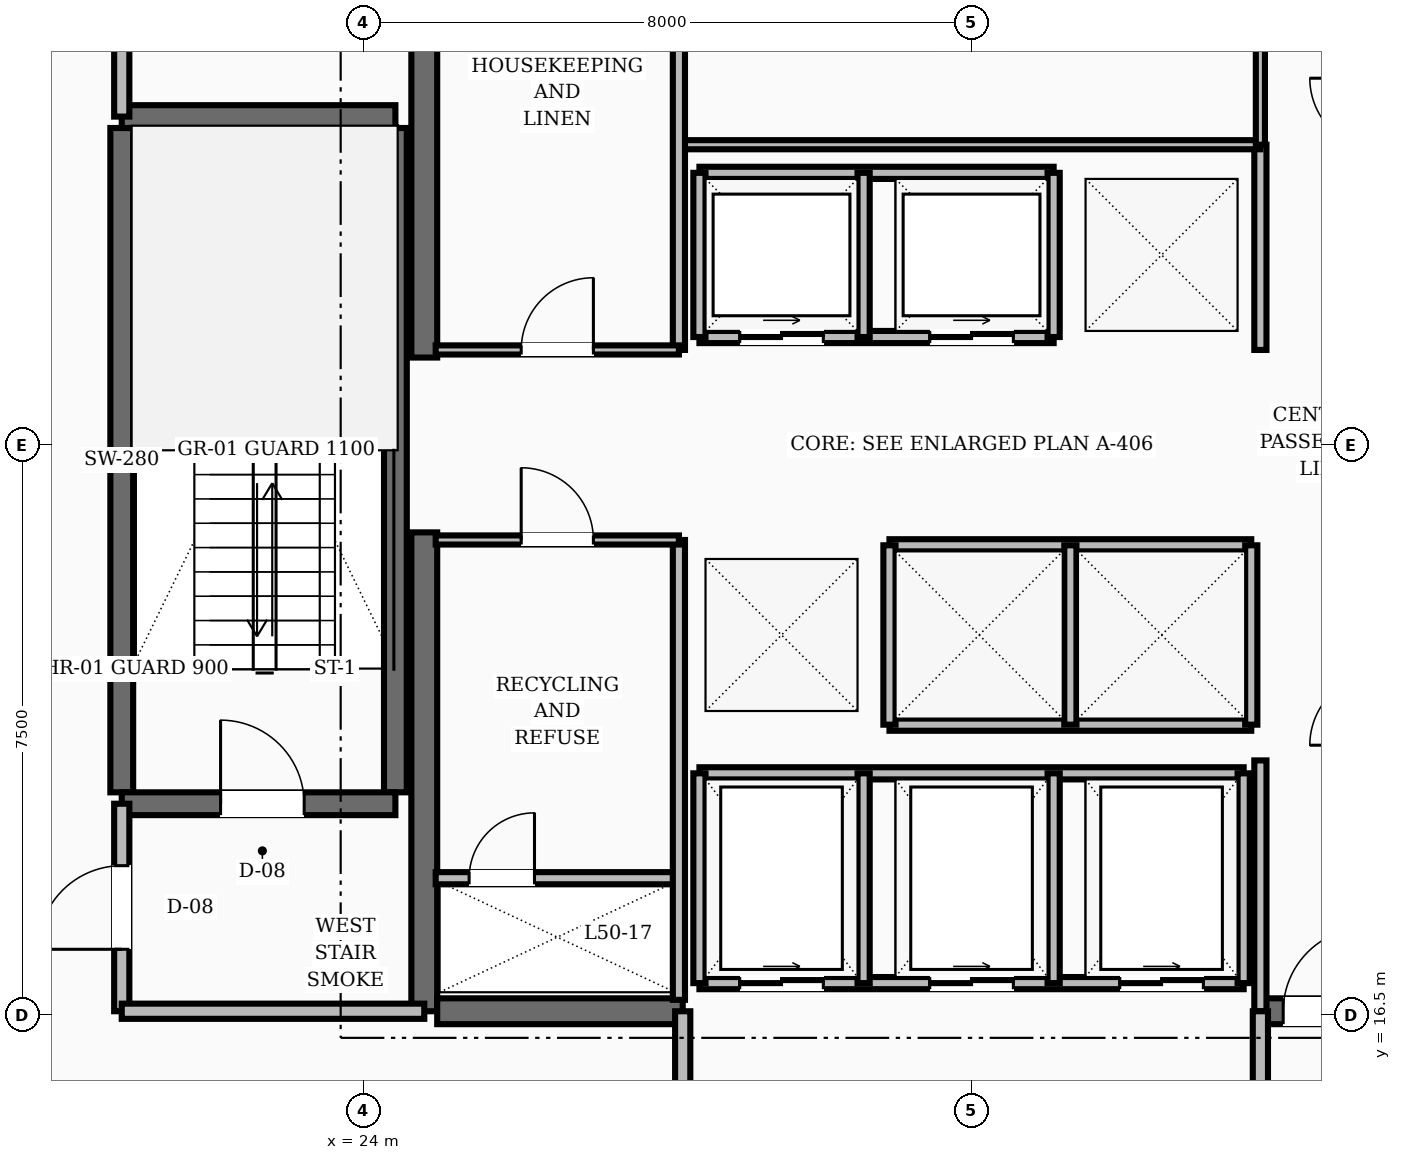
"""IFC4 building model, lengths in metres.
Left out: names, types, materials, properties, quantities, classifications, styles, units other than length and angle.
Written with IfcOpenShell. Run it as: python <this file> out.ifc"""

import sys

from ifc_helpers import new_model, si_unit, direction, frame, frame_2d, origin, place, context, subcontext, project, spatial, rectangle, extrude, element, fill, save


model = new_model("IFC4")
c1 = context("Model", 3, precision=1e-05, world=origin(), true_north=direction((0.0, 1.0)))
c2 = subcontext(c1, "Body", "Model", "MODEL_VIEW")
j1 = project(units=[si_unit("LENGTHUNIT", "METRE"), si_unit("PLANEANGLEUNIT", "RADIAN")], contexts=[c1])
p1 = place(None, origin())
s1 = spatial("IfcSite", under=j1, at=p1, CompositionType="ELEMENT")
p2 = place(p1, origin())
s2 = spatial("IfcBuilding", under=s1, at=p2, CompositionType="ELEMENT")
p3 = place(p2, frame((0.0, 0.0, 192.8)))
s3 = spatial("IfcBuildingStorey", under=s2, at=p3, CompositionType="ELEMENT", Elevation=192.8)
for number, where, z_axis, x_axis in (
    (1, (24.8, 16.55, 0.0), (0.0, 0.0, 1.0), (0.0, 1.0, 0.0)),
    (2, (24.8, 25.15, 0.0), (0.0, 0.0, 1.0), (0.0, 1.0, 0.0)),
):
    element("IfcWall", number, at=place(p3, frame(where, z_axis=z_axis, x_axis=x_axis)), inside=s3, PredefinedType="SHEAR", context=c2, shape_type="SweptSolid", body=[
        extrude(rectangle(XDim=6.3, YDim=0.34, at=frame_2d((3.15, 0.0))), origin(), (0.0, 0.0, 1.0), 3.6),
    ])
p4 = place(p3, frame((24.97, 16.55, 0.0), z_axis=(0.0, 0.0, 1.0), x_axis=(1.0, 0.0, 0.0)))
e3 = element("IfcWall", 3, at=p4, inside=s3, PredefinedType="SHEAR", context=c2, shape_type="SweptSolid", body=[
    extrude(rectangle(XDim=3.23, YDim=0.34, at=frame_2d((1.615, 0.0))), origin(), (0.0, 0.0, 1.0), 3.6),
])
p5 = place(p3, frame((35.8, 16.55, 0.0), z_axis=(0.0, 0.0, 1.0), x_axis=(1.0, 0.0, 0.0)))
e4 = element("IfcWall", 4, at=p5, inside=s3, PredefinedType="SHEAR", context=c2, shape_type="SweptSolid", body=[
    extrude(rectangle(XDim=3.23, YDim=0.34, at=frame_2d((1.615, 0.0))), origin(), (0.0, 0.0, 1.0), 3.6),
])
p6 = place(p5, frame((0.3, 0.0, 0.0)))
e5 = element("IfcOpeningElement", 5, at=p6, cuts=e4, PredefinedType="OPENING", context=c2, shape_type="SweptSolid", body=[
    extrude(rectangle(XDim=1.1, YDim=2.1, at=frame_2d((0.55, 1.05))), frame((0.0, 0.18, 0.0), z_axis=(0.0, -1.0, 0.0), x_axis=(1.0, 0.0, 0.0)), (0.0, 0.0, 1.0), 0.36),
])
for number, where, z_axis, x_axis in (
    (6, (20.82, 19.43, 0.0), (0.0, 0.0, 1.0), (0.0, 1.0, 0.0)),
    (7, (24.42, 19.43, 0.0), (0.0, 0.0, 1.0), (0.0, 1.0, 0.0)),
):
    element("IfcWall", number, at=place(p3, frame(where, z_axis=z_axis, x_axis=x_axis)), inside=s3, PredefinedType="SHEAR", context=c2, shape_type="SweptSolid", body=[
        extrude(rectangle(XDim=8.74, YDim=0.3, at=frame_2d((4.37, 0.0))), origin(), (0.0, 0.0, 1.0), 3.6),
    ])
p7 = place(p3, frame((20.82, 19.28, 0.0), z_axis=(0.0, 0.0, 1.0), x_axis=(1.0, 0.0, 0.0)))
e8 = element("IfcWall", 8, at=p7, inside=s3, PredefinedType="SHEAR", context=c2, shape_type="SweptSolid", body=[
    extrude(rectangle(XDim=3.6, YDim=0.3, at=frame_2d((1.8, 0.0))), origin(), (0.0, 0.0, 1.0), 3.6),
])
p8 = place(p7, frame((1.3, 0.0, 0.0)))
e9 = element("IfcOpeningElement", 9, at=p8, cuts=e8, PredefinedType="OPENING", context=c2, shape_type="SweptSolid", body=[
    extrude(rectangle(XDim=1.1, YDim=2.1, at=frame_2d((0.55, 1.05))), frame((0.0, 0.16, 0.0), z_axis=(0.0, -1.0, 0.0), x_axis=(1.0, 0.0, 0.0)), (0.0, 0.0, 1.0), 0.32),
])
p9 = place(p3, frame((20.82, 28.32, 0.0), z_axis=(0.0, 0.0, 1.0), x_axis=(1.0, 0.0, 0.0)))
e10 = element("IfcWall", 10, at=p9, inside=s3, PredefinedType="SHEAR", context=c2, shape_type="SweptSolid", body=[
    extrude(rectangle(XDim=3.6, YDim=0.3, at=frame_2d((1.8, 0.0))), origin(), (0.0, 0.0, 1.0), 3.6),
])
p10 = place(p3, frame((20.82, 16.55, 0.0), z_axis=(0.0, 0.0, 1.0), x_axis=(0.0, 1.0, 0.0)))
e11 = element("IfcWall", 11, at=p10, inside=s3, PredefinedType="SOLIDWALL", context=c2, shape_type="SweptSolid", body=[
    extrude(rectangle(XDim=2.73, YDim=0.2, at=frame_2d((1.365, 0.0))), origin(), (0.0, 0.0, 1.0), 2.8),
])
p11 = place(p10, frame((0.815, 0.0, 0.0)))
e12 = element("IfcOpeningElement", 12, at=p11, cuts=e11, PredefinedType="OPENING", context=c2, shape_type="SweptSolid", body=[
    extrude(rectangle(XDim=1.1, YDim=2.1, at=frame_2d((0.55, 1.05))), frame((0.0, 0.11, 0.0), z_axis=(0.0, -1.0, 0.0), x_axis=(1.0, 0.0, 0.0)), (0.0, 0.0, 1.0), 0.22),
])
p12 = place(p3, frame((20.82, 16.55, 0.0), z_axis=(0.0, 0.0, 1.0), x_axis=(1.0, 0.0, 0.0)))
e13 = element("IfcWall", 13, at=p12, inside=s3, PredefinedType="SOLIDWALL", context=c2, shape_type="SweptSolid", body=[
    extrude(rectangle(XDim=3.98, YDim=0.2, at=frame_2d((1.99, 0.0))), origin(), (0.0, 0.0, 1.0), 2.8),
])
p13 = place(p3, frame((20.82, 28.32, 0.0), z_axis=(0.0, 0.0, 1.0), x_axis=(0.0, 1.0, 0.0)))
e14 = element("IfcWall", 14, at=p13, inside=s3, PredefinedType="SOLIDWALL", context=c2, shape_type="SweptSolid", body=[
    extrude(rectangle(XDim=3.13, YDim=0.2, at=frame_2d((1.565, 0.0))), origin(), (0.0, 0.0, 1.0), 2.8),
])
p14 = place(p13, frame((1.09, 0.0, 0.0)))
e15 = element("IfcOpeningElement", 15, at=p14, cuts=e14, PredefinedType="OPENING", context=c2, shape_type="SweptSolid", body=[
    extrude(rectangle(XDim=0.95, YDim=2.1, at=frame_2d((0.475, 1.05))), frame((0.0, 0.11, 0.0), z_axis=(0.0, -1.0, 0.0), x_axis=(1.0, 0.0, 0.0)), (0.0, 0.0, 1.0), 0.22),
])
p15 = place(p3, frame((35.8, 16.55, 0.0), z_axis=(0.0, 0.0, 1.0), x_axis=(0.0, 1.0, 0.0)))
e16 = element("IfcWall", 16, at=p15, inside=s3, PredefinedType="SOLIDWALL", context=c2, shape_type="SweptSolid", body=[
    extrude(rectangle(XDim=3.3, YDim=0.16, at=frame_2d((1.65, 0.0))), origin(), (0.0, 0.0, 1.0), 2.8),
])
p16 = place(p3, frame((35.8, 25.25, 0.0), z_axis=(0.0, 0.0, 1.0), x_axis=(0.0, 1.0, 0.0)))
e17 = element("IfcWall", 17, at=p16, inside=s3, PredefinedType="SOLIDWALL", context=c2, shape_type="SweptSolid", body=[
    extrude(rectangle(XDim=2.7, YDim=0.16, at=frame_2d((1.35, 0.0))), origin(), (0.0, 0.0, 1.0), 2.8),
])
for number, where, z_axis, x_axis in (
    (18, (28.2, 14.35, 0.0), (0.0, 0.0, 1.0), (0.0, 1.0, 0.0)),
    (19, (35.8, 14.35, 0.0), (0.0, 0.0, 1.0), (0.0, 1.0, 0.0)),
):
    element("IfcWall", number, at=place(p3, frame(where, z_axis=z_axis, x_axis=x_axis)), inside=s3, PredefinedType="SOLIDWALL", context=c2, shape_type="SweptSolid", body=[
        extrude(rectangle(XDim=2.2, YDim=0.2, at=frame_2d((1.1, 0.0))), origin(), (0.0, 0.0, 1.0), 2.8),
    ])
p17 = place(p3, frame((28.42, 25.42, 0.0), z_axis=(0.0, 0.0, 1.0), x_axis=(1.0, 0.0, 0.0)))
e20 = element("IfcWall", 20, at=p17, inside=s3, PredefinedType="SOLIDWALL", context=c2, shape_type="SweptSolid", body=[
    extrude(rectangle(XDim=4.66, YDim=0.16, at=frame_2d((2.33, 0.0))), origin(), (0.0, 0.0, 1.0), 2.8),
])
p18 = place(p17, frame((0.53, 0.0, 0.0)))
e21 = element("IfcOpeningElement", 21, at=p18, cuts=e20, PredefinedType="OPENING", context=c2, shape_type="SweptSolid", body=[
    extrude(rectangle(XDim=1.1, YDim=2.15, at=frame_2d((0.55, 1.075))), frame((0.0, 0.09, 0.0), z_axis=(0.0, -1.0, 0.0), x_axis=(1.0, 0.0, 0.0)), (0.0, 0.0, 1.0), 0.18),
])
p19 = place(p17, frame((3.03, 0.0, 0.0)))
e22 = element("IfcOpeningElement", 22, at=p19, cuts=e20, PredefinedType="OPENING", context=c2, shape_type="SweptSolid", body=[
    extrude(rectangle(XDim=1.1, YDim=2.15, at=frame_2d((0.55, 1.075))), frame((0.0, 0.09, 0.0), z_axis=(0.0, -1.0, 0.0), x_axis=(1.0, 0.0, 0.0)), (0.0, 0.0, 1.0), 0.18),
])
p20 = place(p3, frame((28.42, 27.58, 0.0), z_axis=(0.0, 0.0, 1.0), x_axis=(1.0, 0.0, 0.0)))
e23 = element("IfcWall", 23, at=p20, inside=s3, PredefinedType="SOLIDWALL", context=c2, shape_type="SweptSolid", body=[
    extrude(rectangle(XDim=4.66, YDim=0.16, at=frame_2d((2.33, 0.0))), origin(), (0.0, 0.0, 1.0), 2.8),
])
for number, where, z_axis, x_axis in (
    (24, (28.42, 25.42, 0.0), (0.0, 0.0, 1.0), (0.0, 1.0, 0.0)),
    (25, (30.58, 25.42, 0.0), (0.0, 0.0, 1.0), (0.0, 1.0, 0.0)),
    (26, (33.08, 25.42, 0.0), (0.0, 0.0, 1.0), (0.0, 1.0, 0.0)),
):
    element("IfcWall", number, at=place(p3, frame(where, z_axis=z_axis, x_axis=x_axis)), inside=s3, PredefinedType="SOLIDWALL", context=c2, shape_type="SweptSolid", body=[
        extrude(rectangle(XDim=2.16, YDim=0.16, at=frame_2d((1.08, 0.0))), origin(), (0.0, 0.0, 1.0), 2.8),
    ])
for number, where, z_axis, x_axis in (
    (27, (30.92, 22.68, 0.0), (0.0, 0.0, 1.0), (1.0, 0.0, 0.0)),
    (28, (30.92, 20.32, 0.0), (0.0, 0.0, 1.0), (1.0, 0.0, 0.0)),
):
    element("IfcWall", number, at=place(p3, frame(where, z_axis=z_axis, x_axis=x_axis)), inside=s3, PredefinedType="SOLIDWALL", context=c2, shape_type="SweptSolid", body=[
        extrude(rectangle(XDim=4.76, YDim=0.16, at=frame_2d((2.38, 0.0))), origin(), (0.0, 0.0, 1.0), 2.8),
    ])
for number, where, z_axis, x_axis in (
    (29, (30.92, 20.32, 0.0), (0.0, 0.0, 1.0), (0.0, 1.0, 0.0)),
    (30, (33.3, 20.32, 0.0), (0.0, 0.0, 1.0), (0.0, 1.0, 0.0)),
    (31, (35.68, 20.32, 0.0), (0.0, 0.0, 1.0), (0.0, 1.0, 0.0)),
):
    element("IfcWall", number, at=place(p3, frame(where, z_axis=z_axis, x_axis=x_axis)), inside=s3, PredefinedType="SOLIDWALL", context=c2, shape_type="SweptSolid", body=[
        extrude(rectangle(XDim=2.36, YDim=0.16, at=frame_2d((1.18, 0.0))), origin(), (0.0, 0.0, 1.0), 2.8),
    ])
p21 = place(p3, frame((28.42, 16.92, 0.0), z_axis=(0.0, 0.0, 1.0), x_axis=(1.0, 0.0, 0.0)))
e32 = element("IfcWall", 32, at=p21, inside=s3, PredefinedType="SOLIDWALL", context=c2, shape_type="SweptSolid", body=[
    extrude(rectangle(XDim=7.16, YDim=0.16, at=frame_2d((3.58, 0.0))), origin(), (0.0, 0.0, 1.0), 2.8),
])
p22 = place(p21, frame((0.53, 0.0, 0.0)))
e33 = element("IfcOpeningElement", 33, at=p22, cuts=e32, PredefinedType="OPENING", context=c2, shape_type="SweptSolid", body=[
    extrude(rectangle(XDim=1.1, YDim=2.15, at=frame_2d((0.55, 1.075))), frame((0.0, 0.09, 0.0), z_axis=(0.0, -1.0, 0.0), x_axis=(1.0, 0.0, 0.0)), (0.0, 0.0, 1.0), 0.18),
])
p23 = place(p21, frame((3.03, 0.0, 0.0)))
e34 = element("IfcOpeningElement", 34, at=p23, cuts=e32, PredefinedType="OPENING", context=c2, shape_type="SweptSolid", body=[
    extrude(rectangle(XDim=1.1, YDim=2.15, at=frame_2d((0.55, 1.075))), frame((0.0, 0.09, 0.0), z_axis=(0.0, -1.0, 0.0), x_axis=(1.0, 0.0, 0.0)), (0.0, 0.0, 1.0), 0.18),
])
p24 = place(p21, frame((5.53, 0.0, 0.0)))
e35 = element("IfcOpeningElement", 35, at=p24, cuts=e32, PredefinedType="OPENING", context=c2, shape_type="SweptSolid", body=[
    extrude(rectangle(XDim=1.1, YDim=2.15, at=frame_2d((0.55, 1.075))), frame((0.0, 0.09, 0.0), z_axis=(0.0, -1.0, 0.0), x_axis=(1.0, 0.0, 0.0)), (0.0, 0.0, 1.0), 0.18),
])
p25 = place(p3, frame((28.42, 19.68, 0.0), z_axis=(0.0, 0.0, 1.0), x_axis=(1.0, 0.0, 0.0)))
e36 = element("IfcWall", 36, at=p25, inside=s3, PredefinedType="SOLIDWALL", context=c2, shape_type="SweptSolid", body=[
    extrude(rectangle(XDim=7.16, YDim=0.16, at=frame_2d((3.58, 0.0))), origin(), (0.0, 0.0, 1.0), 2.8),
])
for number, where, z_axis, x_axis in (
    (37, (28.42, 16.92, 0.0), (0.0, 0.0, 1.0), (0.0, 1.0, 0.0)),
    (38, (30.58, 16.92, 0.0), (0.0, 0.0, 1.0), (0.0, 1.0, 0.0)),
    (39, (33.08, 16.92, 0.0), (0.0, 0.0, 1.0), (0.0, 1.0, 0.0)),
    (40, (35.58, 16.92, 0.0), (0.0, 0.0, 1.0), (0.0, 1.0, 0.0)),
):
    element("IfcWall", number, at=place(p3, frame(where, z_axis=z_axis, x_axis=x_axis)), inside=s3, PredefinedType="SOLIDWALL", context=c2, shape_type="SweptSolid", body=[
        extrude(rectangle(XDim=2.76, YDim=0.16, at=frame_2d((1.38, 0.0))), origin(), (0.0, 0.0, 1.0), 2.8),
    ])
p26 = place(p3, frame((28.2, 27.95, 0.0), z_axis=(0.0, 0.0, 1.0), x_axis=(1.0, 0.0, 0.0)))
e41 = element("IfcWall", 41, at=p26, inside=s3, PredefinedType="PARTITIONING", context=c2, shape_type="SweptSolid", body=[
    extrude(rectangle(XDim=7.6, YDim=0.12, at=frame_2d((3.8, 0.0))), origin(), (0.0, 0.0, 1.0), 2.8),
])
p27 = place(p3, frame((35.8, 27.95, 0.0), z_axis=(0.0, 0.0, 1.0), x_axis=(0.0, 1.0, 0.0)))
e42 = element("IfcWall", 42, at=p27, inside=s3, PredefinedType="PARTITIONING", context=c2, shape_type="SweptSolid", body=[
    extrude(rectangle(XDim=3.5, YDim=0.12, at=frame_2d((1.75, 0.0))), origin(), (0.0, 0.0, 1.0), 2.8),
])
p28 = place(p27, frame((1.275, 0.0, 0.0)))
e43 = element("IfcOpeningElement", 43, at=p28, cuts=e42, PredefinedType="OPENING", context=c2, shape_type="SweptSolid", body=[
    extrude(rectangle(XDim=0.95, YDim=2.1, at=frame_2d((0.475, 1.05))), frame((0.0, 0.07, 0.0), z_axis=(0.0, -1.0, 0.0), x_axis=(1.0, 0.0, 0.0)), (0.0, 0.0, 1.0), 0.14),
])
p29 = place(p3, frame((24.95, 18.3, 0.0), z_axis=(0.0, 0.0, 1.0), x_axis=(1.0, 0.0, 0.0)))
e44 = element("IfcWall", 44, at=p29, inside=s3, PredefinedType="SOLIDWALL", context=c2, shape_type="SweptSolid", body=[
    extrude(rectangle(XDim=3.2, YDim=0.16, at=frame_2d((1.6, 0.0))), origin(), (0.0, 0.0, 1.0), 2.8),
])
p30 = place(p29, frame((0.44, 0.0, 0.0)))
e45 = element("IfcOpeningElement", 45, at=p30, cuts=e44, PredefinedType="OPENING", context=c2, shape_type="SweptSolid", body=[
    extrude(rectangle(XDim=0.86, YDim=2.05, at=frame_2d((0.43, 1.025))), frame((0.0, 0.09, 0.0), z_axis=(0.0, -1.0, 0.0), x_axis=(1.0, 0.0, 0.0)), (0.0, 0.0, 1.0), 0.18),
])
p31 = place(p3, frame((28.15, 16.7, 0.0), z_axis=(0.0, 0.0, 1.0), x_axis=(0.0, 1.0, 0.0)))
e46 = element("IfcWall", 46, at=p31, inside=s3, PredefinedType="SOLIDWALL", context=c2, shape_type="SweptSolid", body=[
    extrude(rectangle(XDim=6.05, YDim=0.16, at=frame_2d((3.025, 0.0))), origin(), (0.0, 0.0, 1.0), 2.8),
])
p32 = place(p3, frame((28.15, 25.25, 0.0), z_axis=(0.0, 0.0, 1.0), x_axis=(0.0, 1.0, 0.0)))
e47 = element("IfcWall", 47, at=p32, inside=s3, PredefinedType="SOLIDWALL", context=c2, shape_type="SweptSolid", body=[
    extrude(rectangle(XDim=6.1, YDim=0.16, at=frame_2d((3.05, 0.0))), origin(), (0.0, 0.0, 1.0), 2.8),
])
p33 = place(p3, frame((24.95, 25.25, 0.0), z_axis=(0.0, 0.0, 1.0), x_axis=(1.0, 0.0, 0.0)))
e48 = element("IfcWall", 48, at=p33, inside=s3, PredefinedType="PARTITIONING", context=c2, shape_type="SweptSolid", body=[
    extrude(rectangle(XDim=3.2, YDim=0.12, at=frame_2d((1.6, 0.0))), origin(), (0.0, 0.0, 1.0), 2.8),
])
p34 = place(p33, frame((1.125, 0.0, 0.0)))
e49 = element("IfcOpeningElement", 49, at=p34, cuts=e48, PredefinedType="OPENING", context=c2, shape_type="SweptSolid", body=[
    extrude(rectangle(XDim=0.95, YDim=2.1, at=frame_2d((0.475, 1.05))), frame((0.0, 0.07, 0.0), z_axis=(0.0, -1.0, 0.0), x_axis=(1.0, 0.0, 0.0)), (0.0, 0.0, 1.0), 0.14),
])
p35 = place(p3, frame((24.95, 22.75, 0.0), z_axis=(0.0, 0.0, 1.0), x_axis=(1.0, 0.0, 0.0)))
e50 = element("IfcWall", 50, at=p35, inside=s3, PredefinedType="PARTITIONING", context=c2, shape_type="SweptSolid", body=[
    extrude(rectangle(XDim=3.2, YDim=0.12, at=frame_2d((1.6, 0.0))), origin(), (0.0, 0.0, 1.0), 2.8),
])
p36 = place(p35, frame((1.125, 0.0, 0.0)))
e51 = element("IfcOpeningElement", 51, at=p36, cuts=e50, PredefinedType="OPENING", context=c2, shape_type="SweptSolid", body=[
    extrude(rectangle(XDim=0.95, YDim=2.1, at=frame_2d((0.475, 1.05))), frame((0.0, 0.07, 0.0), z_axis=(0.0, -1.0, 0.0), x_axis=(1.0, 0.0, 0.0)), (0.0, 0.0, 1.0), 0.14),
])
p37 = place(p8, origin())
e52 = element("IfcDoor", 52, at=p37, inside=s3, OperationType="SINGLE_SWING_LEFT", PredefinedType="DOOR", context=c2, shape_type="SweptSolid", body=[
    extrude(rectangle(XDim=1.1, YDim=2.1, at=frame_2d((0.55, 1.05))), frame((0.0, 0.025, 0.0), z_axis=(0.0, -1.0, 0.0), x_axis=(1.0, 0.0, 0.0)), (0.0, 0.0, 1.0), 0.05),
])
fill(e9, e52)
p38 = place(p11, origin())
e53 = element("IfcDoor", 53, at=p38, inside=s3, OperationType="SINGLE_SWING_LEFT", PredefinedType="DOOR", context=c2, shape_type="SweptSolid", body=[
    extrude(rectangle(XDim=1.1, YDim=2.1, at=frame_2d((0.55, 1.05))), frame((0.0, 0.025, 0.0), z_axis=(0.0, -1.0, 0.0), x_axis=(1.0, 0.0, 0.0)), (0.0, 0.0, 1.0), 0.05),
])
fill(e12, e53)
p39 = place(p6, origin())
e54 = element("IfcDoor", 54, at=p39, inside=s3, OperationType="SINGLE_SWING_RIGHT", PredefinedType="DOOR", context=c2, shape_type="SweptSolid", body=[
    extrude(rectangle(XDim=1.1, YDim=2.1, at=frame_2d((0.55, 1.05))), frame((0.0, 0.025, 0.0), z_axis=(0.0, -1.0, 0.0), x_axis=(1.0, 0.0, 0.0)), (0.0, 0.0, 1.0), 0.05),
])
fill(e5, e54)
p40 = place(p18, origin())
e55 = element("IfcDoor", 55, at=p40, inside=s3, OperationType="SLIDING_TO_RIGHT", PredefinedType="DOOR", context=c2, shape_type="SweptSolid", body=[
    extrude(rectangle(XDim=1.1, YDim=2.15, at=frame_2d((0.55, 1.075))), frame((0.0, 0.025, 0.0), z_axis=(0.0, -1.0, 0.0), x_axis=(1.0, 0.0, 0.0)), (0.0, 0.0, 1.0), 0.05),
])
fill(e21, e55)
p41 = place(p19, origin())
e56 = element("IfcDoor", 56, at=p41, inside=s3, OperationType="SLIDING_TO_RIGHT", PredefinedType="DOOR", context=c2, shape_type="SweptSolid", body=[
    extrude(rectangle(XDim=1.1, YDim=2.15, at=frame_2d((0.55, 1.075))), frame((0.0, 0.025, 0.0), z_axis=(0.0, -1.0, 0.0), x_axis=(1.0, 0.0, 0.0)), (0.0, 0.0, 1.0), 0.05),
])
fill(e22, e56)
p42 = place(p22, origin())
e57 = element("IfcDoor", 57, at=p42, inside=s3, OperationType="SLIDING_TO_RIGHT", PredefinedType="DOOR", context=c2, shape_type="SweptSolid", body=[
    extrude(rectangle(XDim=1.1, YDim=2.15, at=frame_2d((0.55, 1.075))), frame((0.0, 0.025, 0.0), z_axis=(0.0, -1.0, 0.0), x_axis=(1.0, 0.0, 0.0)), (0.0, 0.0, 1.0), 0.05),
])
fill(e33, e57)
p43 = place(p23, origin())
e58 = element("IfcDoor", 58, at=p43, inside=s3, OperationType="SLIDING_TO_RIGHT", PredefinedType="DOOR", context=c2, shape_type="SweptSolid", body=[
    extrude(rectangle(XDim=1.1, YDim=2.15, at=frame_2d((0.55, 1.075))), frame((0.0, 0.025, 0.0), z_axis=(0.0, -1.0, 0.0), x_axis=(1.0, 0.0, 0.0)), (0.0, 0.0, 1.0), 0.05),
])
fill(e34, e58)
p44 = place(p24, origin())
e59 = element("IfcDoor", 59, at=p44, inside=s3, OperationType="SLIDING_TO_RIGHT", PredefinedType="DOOR", context=c2, shape_type="SweptSolid", body=[
    extrude(rectangle(XDim=1.1, YDim=2.15, at=frame_2d((0.55, 1.075))), frame((0.0, 0.025, 0.0), z_axis=(0.0, -1.0, 0.0), x_axis=(1.0, 0.0, 0.0)), (0.0, 0.0, 1.0), 0.05),
])
fill(e35, e59)
p45 = place(p30, origin())
e60 = element("IfcDoor", 60, at=p45, inside=s3, OperationType="SINGLE_SWING_RIGHT", PredefinedType="TRAPDOOR", context=c2, shape_type="SweptSolid", body=[
    extrude(rectangle(XDim=0.86, YDim=2.05, at=frame_2d((0.43, 1.025))), frame((0.0, 0.025, 0.0), z_axis=(0.0, -1.0, 0.0), x_axis=(1.0, 0.0, 0.0)), (0.0, 0.0, 1.0), 0.05),
])
fill(e45, e60)
p46 = place(p34, origin())
e61 = element("IfcDoor", 61, at=p46, inside=s3, OperationType="SINGLE_SWING_RIGHT", PredefinedType="DOOR", context=c2, shape_type="SweptSolid", body=[
    extrude(rectangle(XDim=0.95, YDim=2.1, at=frame_2d((0.475, 1.05))), frame((0.0, 0.025, 0.0), z_axis=(0.0, -1.0, 0.0), x_axis=(1.0, 0.0, 0.0)), (0.0, 0.0, 1.0), 0.05),
])
fill(e49, e61)
p47 = place(p36, origin())
e62 = element("IfcDoor", 62, at=p47, inside=s3, OperationType="SINGLE_SWING_LEFT", PredefinedType="DOOR", context=c2, shape_type="SweptSolid", body=[
    extrude(rectangle(XDim=0.95, YDim=2.1, at=frame_2d((0.475, 1.05))), frame((0.0, 0.025, 0.0), z_axis=(0.0, -1.0, 0.0), x_axis=(1.0, 0.0, 0.0)), (0.0, 0.0, 1.0), 0.05),
])
fill(e51, e62)
save(model, sys.argv[1])
